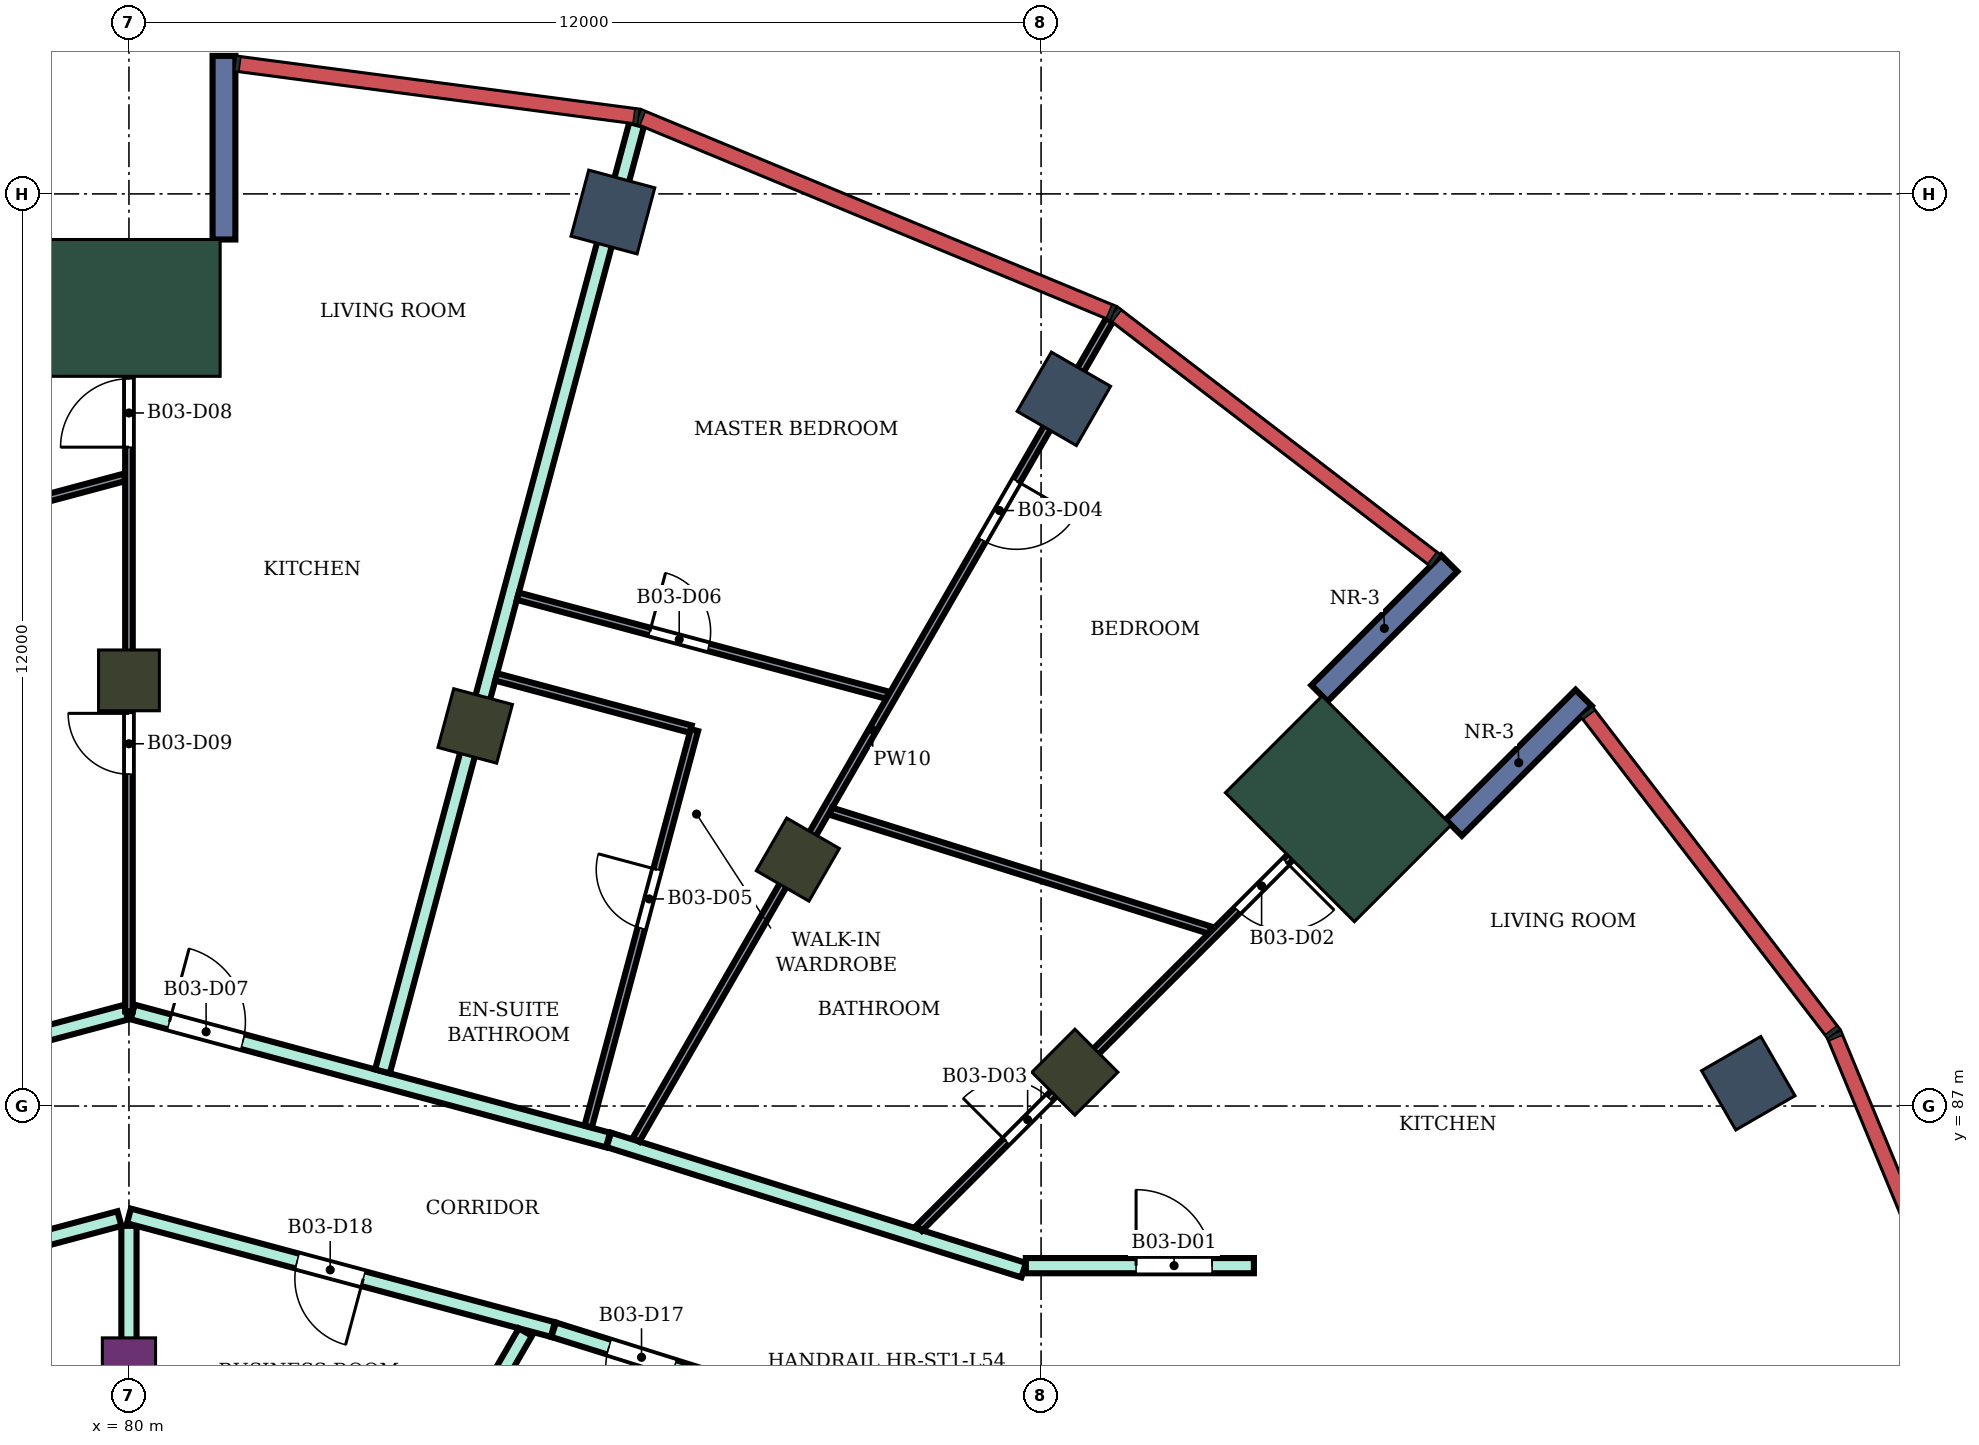
"""IFC4 building model, lengths in metres.
Left out: names, types, materials, properties, quantities, classifications, styles, units other than length and angle.
Written with IfcOpenShell. Run it as: python <this file> out.ifc"""

import sys

from ifc_helpers import new_model, si_unit, direction, frame, frame_2d, origin, origin_2d, place, context, subcontext, project, spatial, rectangle, extrude, element, fill, save


model = new_model("IFC4")
c1 = context("Model", 3, precision=1e-05, world=origin(), true_north=direction((0.0, 1.0)))
c2 = subcontext(c1, "Body", "Model", "MODEL_VIEW")
j1 = project(units=[si_unit("LENGTHUNIT", "METRE"), si_unit("PLANEANGLEUNIT", "RADIAN")], contexts=[c1])
p1 = place(None, origin())
s1 = spatial("IfcSite", under=j1, at=p1, CompositionType="ELEMENT")
p2 = place(p1, origin())
s2 = spatial("IfcBuilding", under=s1, at=p2, CompositionType="ELEMENT")
p3 = place(p2, frame((0.0, 0.0, 237.3)))
s3 = spatial("IfcBuildingStorey", under=s2, at=p3, CompositionType="ELEMENT", Elevation=237.3)
for number, where, z_axis, x_axis in (
    (1, (101.304, 87.3, 0.0), (0.0, 0.0, 1.0), (0.866, 0.5, 0.0)),
    (2, (92.3, 96.304, 0.0), (0.0, 0.0, 1.0), (0.5, 0.866, 0.0)),
    (3, (86.367, 98.762, 0.0), (0.0, 0.0, 1.0), (0.259, 0.966, 0.0)),
):
    element("IfcColumn", number, at=place(p3, frame(where, z_axis=z_axis, x_axis=x_axis)), inside=s3, PredefinedType="COLUMN", context=c2, shape_type="SweptSolid", body=[
        extrude(rectangle(XDim=0.9, YDim=0.9, at=origin_2d()), origin(), (0.0, 0.0, 1.0), 4.2),
    ])
for number, where, z_axis, x_axis in (
    (4, (92.445, 87.445, 0.0), (0.0, 0.0, 1.0), (0.707, 0.707, 0.0)),
    (5, (88.8, 90.242, 0.0), (0.0, 0.0, 1.0), (0.5, 0.866, 0.0)),
    (6, (84.555, 92.0, 0.0), (0.0, 0.0, 1.0), (0.259, 0.966, 0.0)),
    (7, (80.0, 92.6, 0.0), (0.0, 0.0, 1.0), (0.0, 1.0, 0.0)),
):
    element("IfcColumn", number, at=place(p3, frame(where, z_axis=z_axis, x_axis=x_axis)), inside=s3, PredefinedType="COLUMN", context=c2, shape_type="SweptSolid", body=[
        extrude(rectangle(XDim=0.8, YDim=0.8, at=origin_2d()), origin(), (0.0, 0.0, 1.0), 4.2),
    ])
p4 = place(p3, frame((80.0, 83.6, 0.0), z_axis=(0.0, 0.0, 1.0), x_axis=(0.0, 1.0, 0.0)))
e8 = element("IfcColumn", 8, at=p4, inside=s3, PredefinedType="COLUMN", context=c2, shape_type="SweptSolid", body=[
    extrude(rectangle(XDim=0.7, YDim=0.7, at=origin_2d()), origin(), (0.0, 0.0, 1.0), 4.2),
])
for number, where, z_axis, x_axis in (
    (9, (95.91, 90.91, 0.0), (0.0, 0.0, 1.0), (0.707, 0.707, 0.0)),
    (10, (80.0, 97.5, 0.0), (0.0, 0.0, 1.0), (0.0, 1.0, 0.0)),
):
    element("IfcColumn", number, at=place(p3, frame(where, z_axis=z_axis, x_axis=x_axis)), inside=s3, PredefinedType="COLUMN", context=c2, shape_type="SweptSolid", body=[
        extrude(rectangle(XDim=1.8, YDim=2.4, at=origin_2d()), origin(), (0.0, 0.0, 1.0), 4.2),
    ])
for number, where, z_axis, x_axis in (
    (11, (97.43, 90.662, 0.0), (0.0, 0.0, 1.0), (0.707, 0.707, 0.0)),
    (12, (95.662, 92.43, 0.0), (0.0, 0.0, 1.0), (0.707, 0.707, 0.0)),
    (13, (81.25, 98.4, 0.0), (0.0, 0.0, 1.0), (0.0, 1.0, 0.0)),
):
    element("IfcWall", number, at=place(p3, frame(where, z_axis=z_axis, x_axis=x_axis)), inside=s3, PredefinedType="NOTDEFINED", context=c2, shape_type="SweptSolid", body=[
        extrude(rectangle(XDim=2.416, YDim=0.3, at=frame_2d((1.208, 0.0))), origin(), (0.0, 0.0, 1.0), 4.2),
    ])
p5 = place(p3, frame((73.687, 86.554, 0.0), z_axis=(0.0, 0.0, 1.0), x_axis=(0.96595928904, 0.258694128106, 0.0)))
e14 = element("IfcWall", 14, at=p5, inside=s3, PredefinedType="PARTITIONING", context=c2, shape_type="SweptSolid", body=[
    extrude(rectangle(XDim=6.496, YDim=0.2, at=frame_2d((3.248, 0.0))), origin(), (0.0, 0.0, 1.0), 3.75),
])
p6 = place(p5, frame((0.55, 0.0, 0.0)))
e15 = element("IfcOpeningElement", 15, at=p6, cuts=e14, PredefinedType="OPENING", context=c2, shape_type="SweptSolid", body=[
    extrude(rectangle(XDim=1.0, YDim=2.1, at=frame_2d((0.5, 1.05))), frame((0.0, 0.11, 0.0), z_axis=(0.0, -1.0, 0.0), x_axis=(1.0, 0.0, 0.0)), (0.0, 0.0, 1.0), 0.22),
])
p7 = place(p3, frame((74.413, 84.057, 0.0), z_axis=(0.0, 0.0, 1.0), x_axis=(0.965972135939, 0.258646153246, 0.0)))
e16 = element("IfcWall", 16, at=p7, inside=s3, PredefinedType="PARTITIONING", context=c2, shape_type="SweptSolid", body=[
    extrude(rectangle(XDim=5.654, YDim=0.2, at=frame_2d((2.827, 0.0))), origin(), (0.0, 0.0, 1.0), 3.75),
])
p8 = place(p7, frame((2.593, 0.0, 0.0)))
e17 = element("IfcOpeningElement", 17, at=p8, cuts=e16, PredefinedType="OPENING", context=c2, shape_type="SweptSolid", body=[
    extrude(rectangle(XDim=0.9, YDim=2.1, at=frame_2d((0.45, 1.05))), frame((0.0, 0.11, 0.0), z_axis=(0.0, -1.0, 0.0), x_axis=(1.0, 0.0, 0.0)), (0.0, 0.0, 1.0), 0.22),
])
p9 = place(p3, frame((80.0, 82.699, 0.0), z_axis=(0.0, 0.0, 1.0), x_axis=(0.0, 1.0, 0.0)))
e18 = element("IfcWall", 18, at=p9, inside=s3, PredefinedType="PARTITIONING", context=c2, shape_type="SweptSolid", body=[
    extrude(rectangle(XDim=2.725, YDim=0.2, at=frame_2d((1.363, 0.0))), origin(), (0.0, 0.0, 1.0), 3.75),
])
p10 = place(p3, frame((80.0, 85.554, 0.0), z_axis=(0.0, 0.0, 1.0), x_axis=(0.965928989968, -0.258807237802, 0.0)))
e19 = element("IfcWall", 19, at=p10, inside=s3, PredefinedType="PARTITIONING", context=c2, shape_type="SweptSolid", body=[
    extrude(rectangle(XDim=5.774, YDim=0.2, at=frame_2d((2.887, 0.0))), origin(), (0.0, 0.0, 1.0), 3.75),
])
p11 = place(p10, frame((2.292, 0.0, 0.0)))
e20 = element("IfcOpeningElement", 20, at=p11, cuts=e19, PredefinedType="OPENING", context=c2, shape_type="SweptSolid", body=[
    extrude(rectangle(XDim=0.9, YDim=2.1, at=frame_2d((0.45, 1.05))), frame((0.0, 0.11, 0.0), z_axis=(0.0, -1.0, 0.0), x_axis=(1.0, 0.0, 0.0)), (0.0, 0.0, 1.0), 0.22),
])
p12 = place(p3, frame((80.049, 88.237, 0.0), z_axis=(0.0, 0.0, 1.0), x_axis=(0.965582990495, -0.260095152718, 0.0)))
e21 = element("IfcWall", 21, at=p12, inside=s3, PredefinedType="PARTITIONING", context=c2, shape_type="SweptSolid", body=[
    extrude(rectangle(XDim=6.476, YDim=0.2, at=frame_2d((3.238, 0.0))), origin(), (0.0, 0.0, 1.0), 3.75),
])
p13 = place(p12, frame((0.5, 0.0, 0.0)))
e22 = element("IfcOpeningElement", 22, at=p13, cuts=e21, PredefinedType="OPENING", context=c2, shape_type="SweptSolid", body=[
    extrude(rectangle(XDim=1.0, YDim=2.1, at=frame_2d((0.5, 1.05))), frame((0.0, 0.11, 0.0), z_axis=(0.0, -1.0, 0.0), x_axis=(1.0, 0.0, 0.0)), (0.0, 0.0, 1.0), 0.22),
])
p14 = place(p3, frame((83.335, 87.456, 0.0), z_axis=(0.0, 0.0, 1.0), x_axis=(0.259184958139, 0.965827705895, 0.0)))
e23 = element("IfcWall", 23, at=p14, inside=s3, PredefinedType="PARTITIONING", context=c2, shape_type="SweptSolid", body=[
    extrude(rectangle(XDim=12.904, YDim=0.2, at=frame_2d((6.452, 0.0))), origin(), (0.0, 0.0, 1.0), 3.75),
])
p15 = place(p3, frame((83.852, 81.665, 0.0), z_axis=(0.0, 0.0, 1.0), x_axis=(0.500185068774, 0.865918527909, 0.0)))
e24 = element("IfcWall", 24, at=p15, inside=s3, PredefinedType="PARTITIONING", context=c2, shape_type="SweptSolid", body=[
    extrude(rectangle(XDim=2.726, YDim=0.2, at=frame_2d((1.363, 0.0))), origin(), (0.0, 0.0, 1.0), 3.75),
])
p16 = place(p3, frame((85.587, 84.057, 0.0), z_axis=(0.0, 0.0, 1.0), x_axis=(0.954239513179, -0.299043393987, 0.0)))
e25 = element("IfcWall", 25, at=p16, inside=s3, PredefinedType="PARTITIONING", context=c2, shape_type="SweptSolid", body=[
    extrude(rectangle(XDim=2.424, YDim=0.2, at=frame_2d((1.212, 0.0))), origin(), (0.0, 0.0, 1.0), 3.75),
])
p17 = place(p16, frame((0.762, 0.0, 0.0)))
e26 = element("IfcOpeningElement", 26, at=p17, cuts=e25, PredefinedType="OPENING", context=c2, shape_type="SweptSolid", body=[
    extrude(rectangle(XDim=0.9, YDim=2.1, at=frame_2d((0.45, 1.05))), frame((0.0, 0.11, 0.0), z_axis=(0.0, -1.0, 0.0), x_axis=(1.0, 0.0, 0.0)), (0.0, 0.0, 1.0), 0.22),
])
p18 = place(p3, frame((86.313, 86.554, 0.0), z_axis=(0.0, 0.0, 1.0), x_axis=(0.954081217458, -0.299548043717, 0.0)))
e27 = element("IfcWall", 27, at=p18, inside=s3, PredefinedType="PARTITIONING", context=c2, shape_type="SweptSolid", body=[
    extrude(rectangle(XDim=5.721, YDim=0.2, at=frame_2d((2.86, 0.0))), origin(), (0.0, 0.0, 1.0), 3.75),
])
p19 = place(p3, frame((91.8, 84.9, 0.0), z_axis=(0.0, 0.0, 1.0), x_axis=(1.0, 0.0, 0.0)))
e28 = element("IfcWall", 28, at=p19, inside=s3, PredefinedType="PARTITIONING", context=c2, shape_type="SweptSolid", body=[
    extrude(rectangle(XDim=3.0, YDim=0.2, at=frame_2d((1.5, 0.0))), origin(), (0.0, 0.0, 1.0), 3.75),
])
p20 = place(p19, frame((1.45, 0.0, 0.0)))
e29 = element("IfcOpeningElement", 29, at=p20, cuts=e28, PredefinedType="OPENING", context=c2, shape_type="SweptSolid", body=[
    extrude(rectangle(XDim=1.0, YDim=2.1, at=frame_2d((0.5, 1.05))), frame((0.0, 0.11, 0.0), z_axis=(0.0, -1.0, 0.0), x_axis=(1.0, 0.0, 0.0)), (0.0, 0.0, 1.0), 0.22),
])
p21 = place(p3, frame((75.035, 93.955, 0.0), z_axis=(0.0, 0.0, 1.0), x_axis=(0.965868648254, 0.259032342228, 0.0)))
e30 = element("IfcWall", 30, at=p21, inside=s3, PredefinedType="PARTITIONING", context=c2, shape_type="SweptSolid", body=[
    extrude(rectangle(XDim=5.08, YDim=0.1, at=frame_2d((2.54, 0.0))), origin(), (0.0, 0.0, 1.0), 3.75),
])
p22 = place(p3, frame((80.0, 88.246, 0.0), z_axis=(0.0, 0.0, 1.0), x_axis=(0.0, 1.0, 0.0)))
e31 = element("IfcWall", 31, at=p22, inside=s3, PredefinedType="PARTITIONING", context=c2, shape_type="SweptSolid", body=[
    extrude(rectangle(XDim=9.954, YDim=0.1, at=frame_2d((4.977, 0.0))), origin(), (0.0, 0.0, 1.0), 3.75),
])
p23 = place(p22, frame((7.422, 0.0, 0.0)))
e32 = element("IfcOpeningElement", 32, at=p23, cuts=e31, PredefinedType="OPENING", context=c2, shape_type="SweptSolid", body=[
    extrude(rectangle(XDim=0.9, YDim=2.1, at=frame_2d((0.45, 1.05))), frame((0.0, 0.06, 0.0), z_axis=(0.0, -1.0, 0.0), x_axis=(1.0, 0.0, 0.0)), (0.0, 0.0, 1.0), 0.12),
])
p24 = place(p22, frame((3.12, 0.0, 0.0)))
e33 = element("IfcOpeningElement", 33, at=p24, cuts=e31, PredefinedType="OPENING", context=c2, shape_type="SweptSolid", body=[
    extrude(rectangle(XDim=0.8, YDim=2.1, at=frame_2d((0.4, 1.05))), frame((0.0, 0.06, 0.0), z_axis=(0.0, -1.0, 0.0), x_axis=(1.0, 0.0, 0.0)), (0.0, 0.0, 1.0), 0.12),
])
p25 = place(p3, frame((84.831, 92.645, 0.0), z_axis=(0.0, 0.0, 1.0), x_axis=(0.965900745566, -0.258912629499, 0.0)))
e34 = element("IfcWall", 34, at=p25, inside=s3, PredefinedType="PARTITIONING", context=c2, shape_type="SweptSolid", body=[
    extrude(rectangle(XDim=2.65, YDim=0.1, at=frame_2d((1.325, 0.0))), origin(), (0.0, 0.0, 1.0), 3.75),
])
p26 = place(p3, frame((85.116, 93.707, 0.0), z_axis=(0.0, 0.0, 1.0), x_axis=(0.965979414561, -0.258618968068, 0.0)))
e35 = element("IfcWall", 35, at=p26, inside=s3, PredefinedType="PARTITIONING", context=c2, shape_type="SweptSolid", body=[
    extrude(rectangle(XDim=5.036, YDim=0.1, at=frame_2d((2.518, 0.0))), origin(), (0.0, 0.0, 1.0), 3.75),
])
p27 = place(p26, frame((1.798, 0.0, 0.0)))
e36 = element("IfcOpeningElement", 36, at=p27, cuts=e35, PredefinedType="OPENING", context=c2, shape_type="SweptSolid", body=[
    extrude(rectangle(XDim=0.8, YDim=2.1, at=frame_2d((0.4, 1.05))), frame((0.0, 0.06, 0.0), z_axis=(0.0, -1.0, 0.0), x_axis=(1.0, 0.0, 0.0)), (0.0, 0.0, 1.0), 0.12),
])
p28 = place(p3, frame((86.042, 86.731, 0.0), z_axis=(0.0, 0.0, 1.0), x_axis=(0.258737592043, 0.96594764789, 0.0)))
e37 = element("IfcWall", 37, at=p28, inside=s3, PredefinedType="PARTITIONING", context=c2, shape_type="SweptSolid", body=[
    extrude(rectangle(XDim=5.399, YDim=0.1, at=frame_2d((2.7, 0.0))), origin(), (0.0, 0.0, 1.0), 3.75),
])
p29 = place(p28, frame((2.7, 0.0, 0.0)))
e38 = element("IfcOpeningElement", 38, at=p29, cuts=e37, PredefinedType="OPENING", context=c2, shape_type="SweptSolid", body=[
    extrude(rectangle(XDim=0.8, YDim=2.1, at=frame_2d((0.4, 1.05))), frame((0.0, 0.06, 0.0), z_axis=(0.0, -1.0, 0.0), x_axis=(1.0, 0.0, 0.0)), (0.0, 0.0, 1.0), 0.12),
])
p30 = place(p3, frame((86.671, 86.554, 0.0), z_axis=(0.0, 0.0, 1.0), x_axis=(0.500104188531, 0.865965242151, 0.0)))
e39 = element("IfcWall", 39, at=p30, inside=s3, PredefinedType="PARTITIONING", context=c2, shape_type="SweptSolid", body=[
    extrude(rectangle(XDim=12.456, YDim=0.1, at=frame_2d((6.228, 0.0))), origin(), (0.0, 0.0, 1.0), 3.75),
])
p31 = place(p30, frame((9.111, 0.0, 0.0)))
e40 = element("IfcOpeningElement", 40, at=p31, cuts=e39, PredefinedType="OPENING", context=c2, shape_type="SweptSolid", body=[
    extrude(rectangle(XDim=0.9, YDim=2.1, at=frame_2d((0.45, 1.05))), frame((0.0, 0.06, 0.0), z_axis=(0.0, -1.0, 0.0), x_axis=(1.0, 0.0, 0.0)), (0.0, 0.0, 1.0), 0.12),
])
p32 = place(p3, frame((89.235, 90.878, 0.0), z_axis=(0.0, 0.0, 1.0), x_axis=(0.954193795587, -0.299189238548, 0.0)))
e41 = element("IfcWall", 41, at=p32, inside=s3, PredefinedType="PARTITIONING", context=c2, shape_type="SweptSolid", body=[
    extrude(rectangle(XDim=5.23, YDim=0.1, at=frame_2d((2.615, 0.0))), origin(), (0.0, 0.0, 1.0), 3.75),
])
p33 = place(p3, frame((90.396, 85.393, 0.0), z_axis=(0.0, 0.0, 1.0), x_axis=(0.707279106146, 0.706934414221, 0.0)))
e42 = element("IfcWall", 42, at=p33, inside=s3, PredefinedType="PARTITIONING", context=c2, shape_type="SweptSolid", body=[
    extrude(rectangle(XDim=8.5, YDim=0.1, at=frame_2d((4.25, 0.0))), origin(), (0.0, 0.0, 1.0), 3.75),
])
p34 = place(p33, frame((5.919, 0.0, 0.0)))
e43 = element("IfcOpeningElement", 43, at=p34, cuts=e42, PredefinedType="OPENING", context=c2, shape_type="SweptSolid", body=[
    extrude(rectangle(XDim=0.9, YDim=2.1, at=frame_2d((0.45, 1.05))), frame((0.0, 0.06, 0.0), z_axis=(0.0, -1.0, 0.0), x_axis=(1.0, 0.0, 0.0)), (0.0, 0.0, 1.0), 0.12),
])
p35 = place(p33, frame((1.617, 0.0, 0.0)))
e44 = element("IfcOpeningElement", 44, at=p35, cuts=e42, PredefinedType="OPENING", context=c2, shape_type="SweptSolid", body=[
    extrude(rectangle(XDim=0.8, YDim=2.1, at=frame_2d((0.4, 1.05))), frame((0.0, 0.06, 0.0), z_axis=(0.0, -1.0, 0.0), x_axis=(1.0, 0.0, 0.0)), (0.0, 0.0, 1.0), 0.12),
])
p36 = place(p20, origin())
e45 = element("IfcDoor", 45, at=p36, inside=s3, OperationType="SINGLE_SWING_LEFT", PredefinedType="DOOR", context=c2, shape_type="SweptSolid", body=[
    extrude(rectangle(XDim=1.0, YDim=2.1, at=frame_2d((0.5, 1.05))), frame((0.0, 0.025, 0.0), z_axis=(0.0, -1.0, 0.0), x_axis=(1.0, 0.0, 0.0)), (0.0, 0.0, 1.0), 0.05),
])
fill(e29, e45)
p37 = place(p34, frame((0.9, 0.0, 0.0), z_axis=(0.0, 0.0, 1.0), x_axis=(-1.0, 0.0, 0.0)))
e46 = element("IfcDoor", 46, at=p37, inside=s3, OperationType="SINGLE_SWING_LEFT", PredefinedType="DOOR", context=c2, shape_type="SweptSolid", body=[
    extrude(rectangle(XDim=0.9, YDim=2.1, at=frame_2d((0.45, 1.05))), frame((0.0, 0.025, 0.0), z_axis=(0.0, -1.0, 0.0), x_axis=(1.0, 0.0, 0.0)), (0.0, 0.0, 1.0), 0.05),
])
fill(e43, e46)
p38 = place(p35, origin())
e47 = element("IfcDoor", 47, at=p38, inside=s3, OperationType="SINGLE_SWING_LEFT", PredefinedType="DOOR", context=c2, shape_type="SweptSolid", body=[
    extrude(rectangle(XDim=0.8, YDim=2.1, at=frame_2d((0.4, 1.05))), frame((0.0, 0.025, 0.0), z_axis=(0.0, -1.0, 0.0), x_axis=(1.0, 0.0, 0.0)), (0.0, 0.0, 1.0), 0.05),
])
fill(e44, e47)
p39 = place(p31, frame((0.9, 0.0, 0.0), z_axis=(0.0, 0.0, 1.0), x_axis=(-1.0, 0.0, 0.0)))
e48 = element("IfcDoor", 48, at=p39, inside=s3, OperationType="SINGLE_SWING_LEFT", PredefinedType="DOOR", context=c2, shape_type="SweptSolid", body=[
    extrude(rectangle(XDim=0.9, YDim=2.1, at=frame_2d((0.45, 1.05))), frame((0.0, 0.025, 0.0), z_axis=(0.0, -1.0, 0.0), x_axis=(1.0, 0.0, 0.0)), (0.0, 0.0, 1.0), 0.05),
])
fill(e40, e48)
p40 = place(p29, origin())
e49 = element("IfcDoor", 49, at=p40, inside=s3, OperationType="SINGLE_SWING_RIGHT", PredefinedType="DOOR", context=c2, shape_type="SweptSolid", body=[
    extrude(rectangle(XDim=0.8, YDim=2.1, at=frame_2d((0.4, 1.05))), frame((0.0, 0.025, 0.0), z_axis=(0.0, -1.0, 0.0), x_axis=(1.0, 0.0, 0.0)), (0.0, 0.0, 1.0), 0.05),
])
fill(e38, e49)
p41 = place(p27, origin())
e50 = element("IfcDoor", 50, at=p41, inside=s3, OperationType="SINGLE_SWING_LEFT", PredefinedType="DOOR", context=c2, shape_type="SweptSolid", body=[
    extrude(rectangle(XDim=0.8, YDim=2.1, at=frame_2d((0.4, 1.05))), frame((0.0, 0.025, 0.0), z_axis=(0.0, -1.0, 0.0), x_axis=(1.0, 0.0, 0.0)), (0.0, 0.0, 1.0), 0.05),
])
fill(e36, e50)
p42 = place(p13, origin())
e51 = element("IfcDoor", 51, at=p42, inside=s3, OperationType="SINGLE_SWING_LEFT", PredefinedType="DOOR", context=c2, shape_type="SweptSolid", body=[
    extrude(rectangle(XDim=1.0, YDim=2.1, at=frame_2d((0.5, 1.05))), frame((0.0, 0.025, 0.0), z_axis=(0.0, -1.0, 0.0), x_axis=(1.0, 0.0, 0.0)), (0.0, 0.0, 1.0), 0.05),
])
fill(e22, e51)
p43 = place(p23, origin())
e52 = element("IfcDoor", 52, at=p43, inside=s3, OperationType="SINGLE_SWING_LEFT", PredefinedType="DOOR", context=c2, shape_type="SweptSolid", body=[
    extrude(rectangle(XDim=0.9, YDim=2.1, at=frame_2d((0.45, 1.05))), frame((0.0, 0.025, 0.0), z_axis=(0.0, -1.0, 0.0), x_axis=(1.0, 0.0, 0.0)), (0.0, 0.0, 1.0), 0.05),
])
fill(e32, e52)
p44 = place(p24, origin())
e53 = element("IfcDoor", 53, at=p44, inside=s3, OperationType="SINGLE_SWING_RIGHT", PredefinedType="DOOR", context=c2, shape_type="SweptSolid", body=[
    extrude(rectangle(XDim=0.8, YDim=2.1, at=frame_2d((0.4, 1.05))), frame((0.0, 0.025, 0.0), z_axis=(0.0, -1.0, 0.0), x_axis=(1.0, 0.0, 0.0)), (0.0, 0.0, 1.0), 0.05),
])
fill(e33, e53)
p45 = place(p17, frame((0.9, 0.0, 0.0), z_axis=(0.0, 0.0, 1.0), x_axis=(-1.0, 0.0, 0.0)))
e54 = element("IfcDoor", 54, at=p45, inside=s3, OperationType="SINGLE_SWING_LEFT", PredefinedType="DOOR", context=c2, shape_type="SweptSolid", body=[
    extrude(rectangle(XDim=0.9, YDim=2.1, at=frame_2d((0.45, 1.05))), frame((0.0, 0.025, 0.0), z_axis=(0.0, -1.0, 0.0), x_axis=(1.0, 0.0, 0.0)), (0.0, 0.0, 1.0), 0.05),
])
fill(e26, e54)
p46 = place(p11, frame((0.9, 0.0, 0.0), z_axis=(0.0, 0.0, 1.0), x_axis=(-1.0, 0.0, 0.0)))
e55 = element("IfcDoor", 55, at=p46, inside=s3, OperationType="SINGLE_SWING_LEFT", PredefinedType="DOOR", context=c2, shape_type="SweptSolid", body=[
    extrude(rectangle(XDim=0.9, YDim=2.1, at=frame_2d((0.45, 1.05))), frame((0.0, 0.025, 0.0), z_axis=(0.0, -1.0, 0.0), x_axis=(1.0, 0.0, 0.0)), (0.0, 0.0, 1.0), 0.05),
])
fill(e20, e55)
save(model, sys.argv[1])
